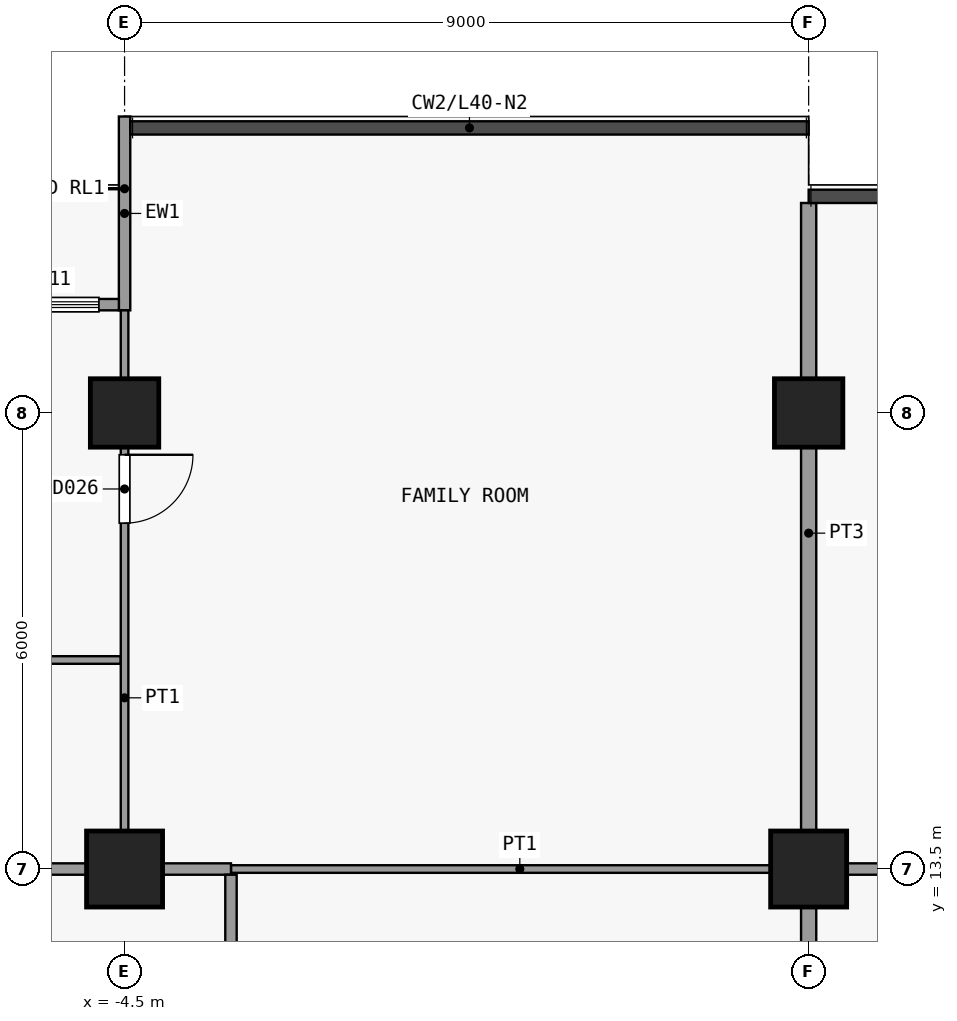
"""IFC4 building model, lengths in metres.
Left out: names, types, materials, properties, quantities, classifications, styles, units other than length and angle.
Written with IfcOpenShell. Run it as: python <this file> out.ifc"""

import sys

from ifc_helpers import new_model, si_unit, direction, frame, frame_2d, origin, origin_2d, place, context, subcontext, project, spatial, rectangle, extrude, element, fill, save


model = new_model("IFC4")
c1 = context("Model", 3, precision=1e-05, world=origin(), true_north=direction((0.0, 1.0)))
c2 = subcontext(c1, "Body", "Model", "MODEL_VIEW")
j1 = project(units=[si_unit("LENGTHUNIT", "METRE"), si_unit("PLANEANGLEUNIT", "RADIAN")], contexts=[c1])
p1 = place(None, origin())
s1 = spatial("IfcSite", under=j1, at=p1, CompositionType="ELEMENT")
p2 = place(p1, origin())
s2 = spatial("IfcBuilding", under=s1, at=p2, CompositionType="ELEMENT")
p3 = place(p2, frame((0.0, 0.0, 163.7)))
s3 = spatial("IfcBuildingStorey", under=s2, at=p3, CompositionType="ELEMENT", Elevation=163.7)
p4 = place(p3, frame((-4.5, 13.5, 0.0), z_axis=(0.0, 0.0, 1.0), x_axis=(1.0, 0.0, 0.0)))
e1 = element("IfcColumn", 1, at=p4, inside=s3, PredefinedType="COLUMN", context=c2, shape_type="SweptSolid", body=[
    extrude(rectangle(XDim=1.0, YDim=1.0, at=origin_2d()), origin(), (0.0, 0.0, 1.0), 3.6),
])
p5 = place(p3, frame((-4.5, 19.5, 0.0), z_axis=(0.0, 0.0, 1.0), x_axis=(1.0, 0.0, 0.0)))
e2 = element("IfcColumn", 2, at=p5, inside=s3, PredefinedType="COLUMN", context=c2, shape_type="SweptSolid", body=[
    extrude(rectangle(XDim=0.9, YDim=0.9, at=origin_2d()), origin(), (0.0, 0.0, 1.0), 3.6),
])
p6 = place(p3, frame((4.5, 13.5, 0.0), z_axis=(0.0, 0.0, 1.0), x_axis=(1.0, 0.0, 0.0)))
e3 = element("IfcColumn", 3, at=p6, inside=s3, PredefinedType="COLUMN", context=c2, shape_type="SweptSolid", body=[
    extrude(rectangle(XDim=1.0, YDim=1.0, at=origin_2d()), origin(), (0.0, 0.0, 1.0), 3.6),
])
p7 = place(p3, frame((4.5, 19.5, 0.0), z_axis=(0.0, 0.0, 1.0), x_axis=(1.0, 0.0, 0.0)))
e4 = element("IfcColumn", 4, at=p7, inside=s3, PredefinedType="COLUMN", context=c2, shape_type="SweptSolid", body=[
    extrude(rectangle(XDim=0.9, YDim=0.9, at=origin_2d()), origin(), (0.0, 0.0, 1.0), 3.6),
])
p8 = place(p3, frame((-4.5, 20.85, 0.0), z_axis=(0.0, 0.0, 1.0), x_axis=(0.0, 1.0, 0.0)))
e5 = element("IfcWall", 5, at=p8, inside=s3, PredefinedType="SOLIDWALL", context=c2, shape_type="SweptSolid", body=[
    extrude(rectangle(XDim=2.55, YDim=0.15, at=frame_2d((1.275, 0.0))), origin(), (0.0, 0.0, 1.0), 3.3),
])
p9 = place(p3, frame((-10.425, 20.925, 0.0), z_axis=(0.0, 0.0, 1.0), x_axis=(1.0, 0.0, 0.0)))
e6 = element("IfcWall", 6, at=p9, inside=s3, PredefinedType="SOLIDWALL", context=c2, shape_type="SweptSolid", body=[
    extrude(rectangle(XDim=5.85, YDim=0.15, at=frame_2d((2.925, 0.0))), origin(), (0.0, 0.0, 1.0), 3.3),
])
p10 = place(p9, frame((2.325, 0.0, 0.0)))
e7 = element("IfcOpeningElement", 7, at=p10, cuts=e6, PredefinedType="OPENING", context=c2, shape_type="SweptSolid", body=[
    extrude(rectangle(XDim=1.2, YDim=2.4, at=frame_2d((0.6, 1.2))), frame((0.0, 0.085, 0.0), z_axis=(0.0, -1.0, 0.0), x_axis=(1.0, 0.0, 0.0)), (0.0, 0.0, 1.0), 0.17),
])
p11 = place(p9, frame((0.262, 0.0, 0.9)))
e8 = element("IfcOpeningElement", 8, at=p11, cuts=e6, PredefinedType="OPENING", context=c2, shape_type="SweptSolid", body=[
    extrude(rectangle(XDim=1.8, YDim=2.1, at=frame_2d((0.9, 1.05))), frame((0.0, 0.085, 0.0), z_axis=(0.0, -1.0, 0.0), x_axis=(1.0, 0.0, 0.0)), (0.0, 0.0, 1.0), 0.17),
])
p12 = place(p9, frame((3.788, 0.0, 0.9)))
e9 = element("IfcOpeningElement", 9, at=p12, cuts=e6, PredefinedType="OPENING", context=c2, shape_type="SweptSolid", body=[
    extrude(rectangle(XDim=1.8, YDim=2.1, at=frame_2d((0.9, 1.05))), frame((0.0, 0.085, 0.0), z_axis=(0.0, -1.0, 0.0), x_axis=(1.0, 0.0, 0.0)), (0.0, 0.0, 1.0), 0.17),
])
p13 = place(p3, frame((-3.1, 13.5, 0.0), z_axis=(0.0, 0.0, 1.0), x_axis=(1.0, 0.0, 0.0)))
e10 = element("IfcWall", 10, at=p13, inside=s3, PredefinedType="PARTITIONING", context=c2, shape_type="SweptSolid", body=[
    extrude(rectangle(XDim=7.6, YDim=0.1, at=frame_2d((3.8, 0.0))), origin(), (0.0, 0.0, 1.0), 3.3),
])
p14 = place(p3, frame((-10.5, 13.5, 0.0), z_axis=(0.0, 0.0, 1.0), x_axis=(1.0, 0.0, 0.0)))
e11 = element("IfcWall", 11, at=p14, inside=s3, PredefinedType="PARTITIONING", context=c2, shape_type="SweptSolid", body=[
    extrude(rectangle(XDim=7.4, YDim=0.15, at=frame_2d((3.7, 0.0))), origin(), (0.0, 0.0, 1.0), 3.3),
])
p15 = place(p3, frame((4.5, 13.5, 0.0), z_axis=(0.0, 0.0, 1.0), x_axis=(1.0, 0.0, 0.0)))
e12 = element("IfcWall", 12, at=p15, inside=s3, PredefinedType="PARTITIONING", context=c2, shape_type="SweptSolid", body=[
    extrude(rectangle(XDim=2.5, YDim=0.15, at=frame_2d((1.25, 0.0))), origin(), (0.0, 0.0, 1.0), 3.3),
])
p16 = place(p3, frame((-10.45, 16.25, 0.0), z_axis=(0.0, 0.0, 1.0), x_axis=(1.0, 0.0, 0.0)))
e13 = element("IfcWall", 13, at=p16, inside=s3, PredefinedType="PARTITIONING", context=c2, shape_type="SweptSolid", body=[
    extrude(rectangle(XDim=5.9, YDim=0.1, at=frame_2d((2.95, 0.0))), origin(), (0.0, 0.0, 1.0), 3.3),
])
p17 = place(p16, frame((2.5, 0.0, 0.0)))
e14 = element("IfcOpeningElement", 14, at=p17, cuts=e13, PredefinedType="OPENING", context=c2, shape_type="SweptSolid", body=[
    extrude(rectangle(XDim=0.9, YDim=2.1, at=frame_2d((0.45, 1.05))), frame((0.0, 0.06, 0.0), z_axis=(0.0, -1.0, 0.0), x_axis=(1.0, 0.0, 0.0)), (0.0, 0.0, 1.0), 0.12),
])
p18 = place(p3, frame((-4.5, 13.575, 0.0), z_axis=(0.0, 0.0, 1.0), x_axis=(0.0, 1.0, 0.0)))
e15 = element("IfcWall", 15, at=p18, inside=s3, PredefinedType="PARTITIONING", context=c2, shape_type="SweptSolid", body=[
    extrude(rectangle(XDim=7.275, YDim=0.1, at=frame_2d((3.638, 0.0))), origin(), (0.0, 0.0, 1.0), 3.3),
])
p19 = place(p18, frame((4.475, 0.0, 0.0)))
e16 = element("IfcOpeningElement", 16, at=p19, cuts=e15, PredefinedType="OPENING", context=c2, shape_type="SweptSolid", body=[
    extrude(rectangle(XDim=0.9, YDim=2.1, at=frame_2d((0.45, 1.05))), frame((0.0, 0.06, 0.0), z_axis=(0.0, -1.0, 0.0), x_axis=(1.0, 0.0, 0.0)), (0.0, 0.0, 1.0), 0.12),
])
p20 = place(p3, frame((-3.1, 10.6, 0.0), z_axis=(0.0, 0.0, 1.0), x_axis=(0.0, 1.0, 0.0)))
e17 = element("IfcWall", 17, at=p20, inside=s3, PredefinedType="PARTITIONING", context=c2, shape_type="SweptSolid", body=[
    extrude(rectangle(XDim=2.825, YDim=0.15, at=frame_2d((1.413, 0.0))), origin(), (0.0, 0.0, 1.0), 3.3),
])
p21 = place(p20, frame((1.0, 0.0, 0.0)))
e18 = element("IfcOpeningElement", 18, at=p21, cuts=e17, PredefinedType="OPENING", context=c2, shape_type="SweptSolid", body=[
    extrude(rectangle(XDim=0.9, YDim=2.1, at=frame_2d((0.45, 1.05))), frame((0.0, 0.085, 0.0), z_axis=(0.0, -1.0, 0.0), x_axis=(1.0, 0.0, 0.0)), (0.0, 0.0, 1.0), 0.17),
])
p22 = place(p3, frame((4.5, 10.6, 0.0), z_axis=(0.0, 0.0, 1.0), x_axis=(0.0, 1.0, 0.0)))
e19 = element("IfcWall", 19, at=p22, inside=s3, PredefinedType="PARTITIONING", context=c2, shape_type="SweptSolid", body=[
    extrude(rectangle(XDim=2.825, YDim=0.2, at=frame_2d((1.413, 0.0))), origin(), (0.0, 0.0, 1.0), 3.3),
])
p23 = place(p3, frame((4.5, 13.575, 0.0), z_axis=(0.0, 0.0, 1.0), x_axis=(0.0, 1.0, 0.0)))
e20 = element("IfcWall", 20, at=p23, inside=s3, PredefinedType="PARTITIONING", context=c2, shape_type="SweptSolid", body=[
    extrude(rectangle(XDim=8.688, YDim=0.2, at=frame_2d((4.344, 0.0))), origin(), (0.0, 0.0, 1.0), 3.3),
])
p24 = place(p12, origin())
e21 = element("IfcWindow", 21, at=p24, inside=s3, PartitioningType="SINGLE_PANEL", PredefinedType="WINDOW", context=c2, shape_type="SweptSolid", body=[
    extrude(rectangle(XDim=1.8, YDim=2.1, at=frame_2d((0.9, 1.05))), frame((0.0, 0.03, 0.0), z_axis=(0.0, -1.0, 0.0), x_axis=(1.0, 0.0, 0.0)), (0.0, 0.0, 1.0), 0.06),
])
fill(e9, e21)
p25 = place(p19, origin())
e22 = element("IfcDoor", 22, at=p25, inside=s3, OperationType="SINGLE_SWING_RIGHT", PredefinedType="DOOR", context=c2, shape_type="SweptSolid", body=[
    extrude(rectangle(XDim=0.9, YDim=2.1, at=frame_2d((0.45, 1.05))), frame((0.0, 0.025, 0.0), z_axis=(0.0, -1.0, 0.0), x_axis=(1.0, 0.0, 0.0)), (0.0, 0.0, 1.0), 0.05),
])
fill(e16, e22)
save(model, sys.argv[1])
